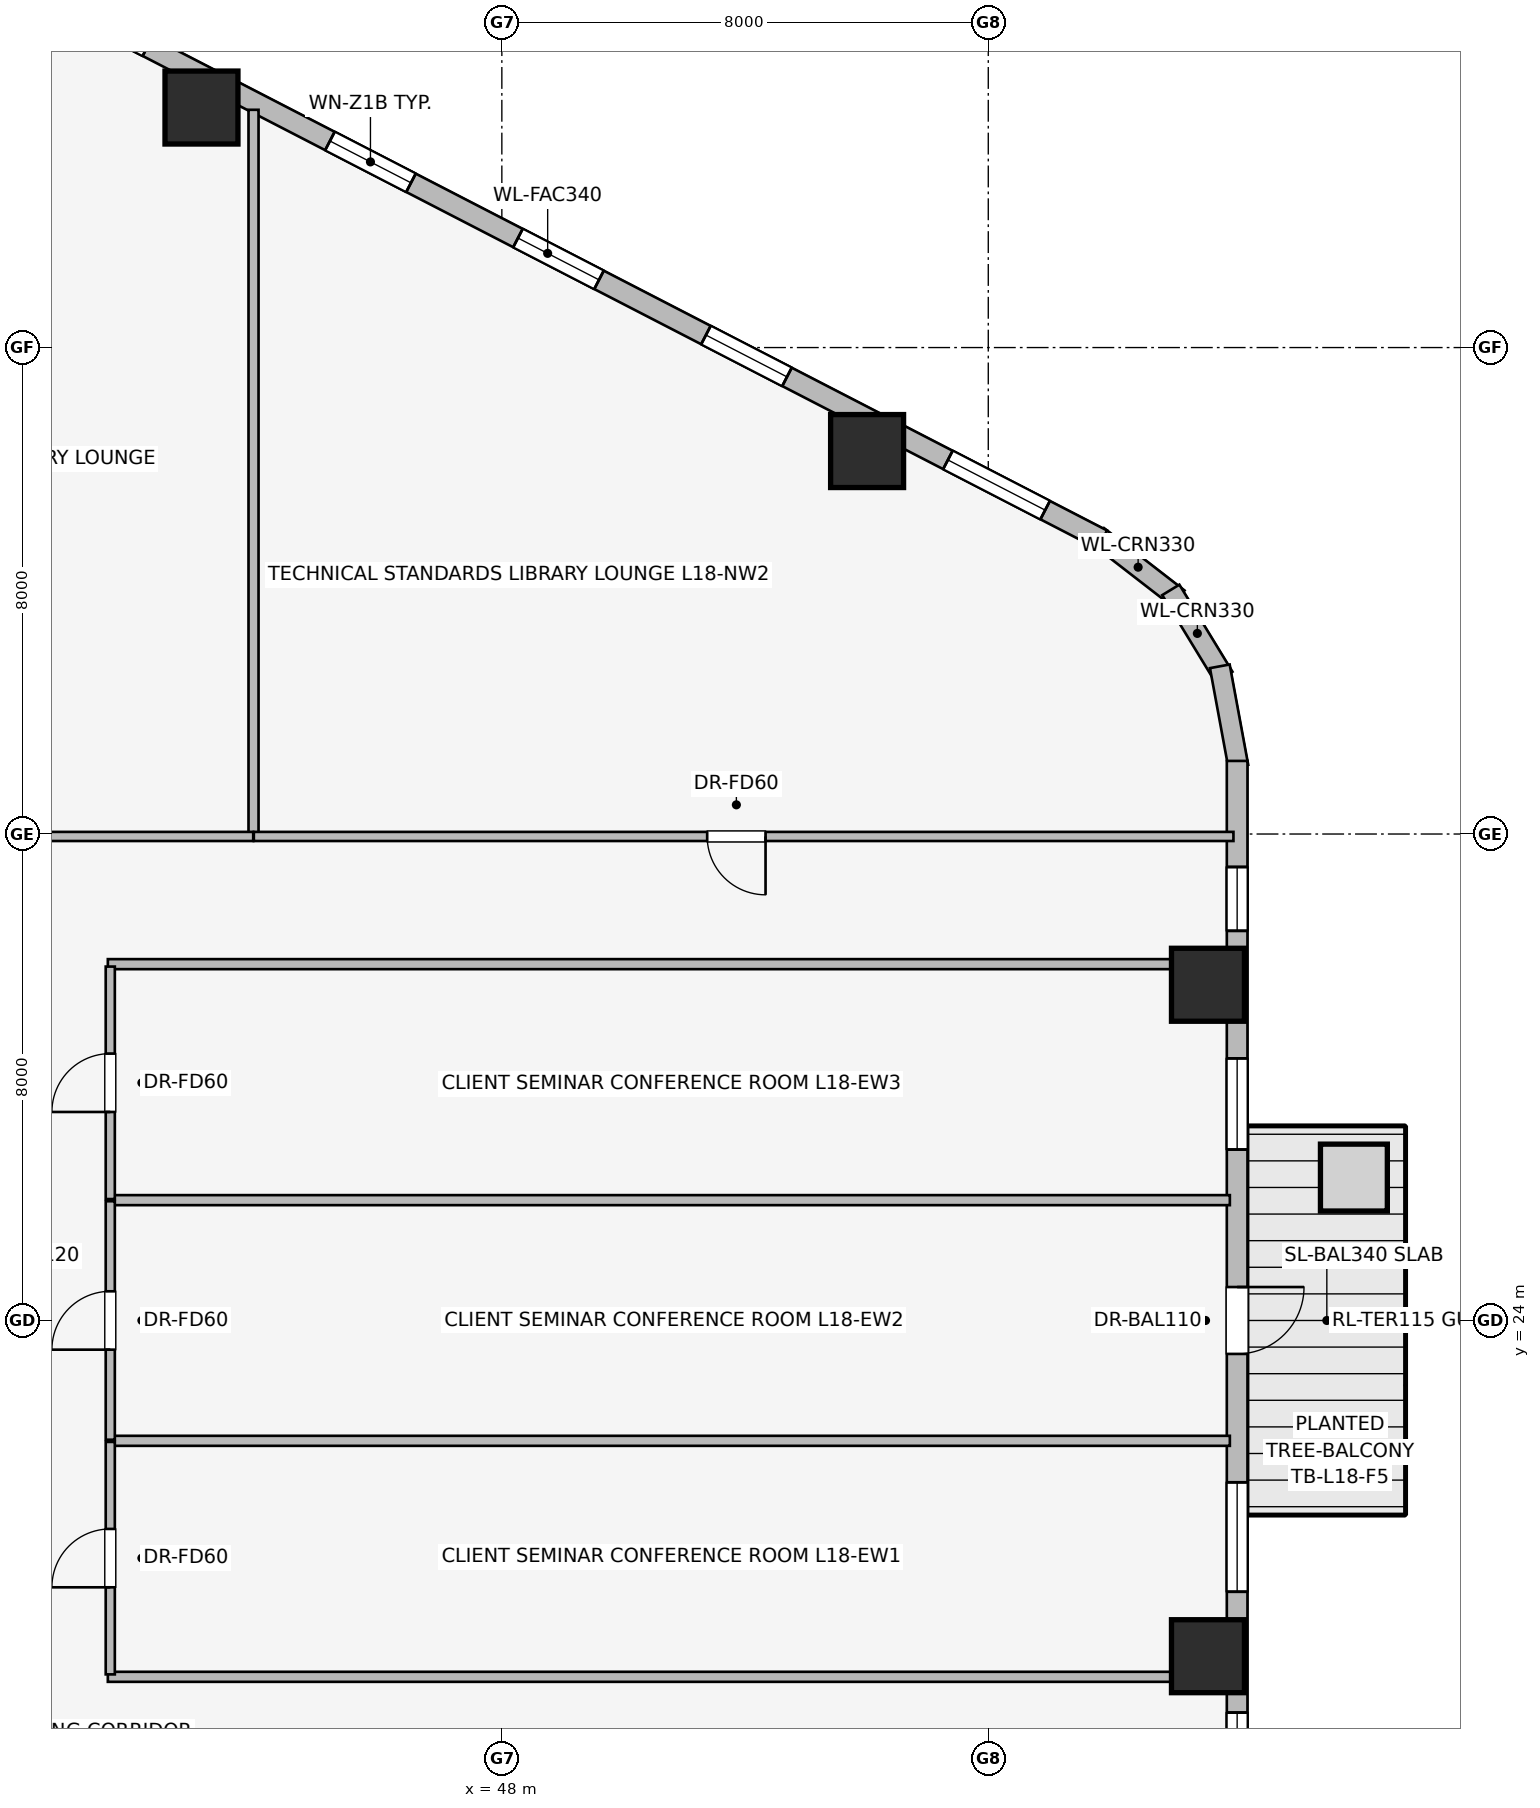
"""IFC4 building model, lengths in metres.
Left out: names, types, materials, properties, quantities, classifications, styles, units other than length and angle.
Written with IfcOpenShell. Run it as: python <this file> out.ifc"""

import sys

from ifc_helpers import new_model, si_unit, direction, frame, frame_2d, origin, origin_2d, place, context, subcontext, project, spatial, rectangle, extrude, element, fill, save


model = new_model("IFC4")
c1 = context("Model", 3, precision=1e-05, world=origin(), true_north=direction((0.0, 1.0)))
c2 = subcontext(c1, "Body", "Model", "MODEL_VIEW")
j1 = project(units=[si_unit("LENGTHUNIT", "METRE"), si_unit("PLANEANGLEUNIT", "RADIAN")], contexts=[c1])
p1 = place(None, origin())
s1 = spatial("IfcSite", under=j1, at=p1, CompositionType="ELEMENT")
p2 = place(p1, origin())
s2 = spatial("IfcBuilding", under=s1, at=p2, CompositionType="ELEMENT")
p3 = place(p2, frame((0.0, 0.0, 70.8)))
s3 = spatial("IfcBuildingStorey", under=s2, at=p3, CompositionType="ELEMENT", Elevation=70.8)
for number, where, z_axis, x_axis in (
    (1, (54.007, 38.298, 0.0), (0.0, 0.0, 1.0), (1.0, 0.0, 0.0)),
    (2, (43.06, 43.947, 0.0), (0.0, 0.0, 1.0), (1.0, 0.0, 0.0)),
    (3, (59.613, 18.479, 0.0), (0.0, 0.0, 1.0), (1.0, 0.0, 0.0)),
    (4, (59.613, 29.521, 0.0), (0.0, 0.0, 1.0), (1.0, 0.0, 0.0)),
):
    element("IfcColumn", number, at=place(p3, frame(where, z_axis=z_axis, x_axis=x_axis)), inside=s3, PredefinedType="COLUMN", context=c2, shape_type="SweptSolid", body=[
        extrude(rectangle(XDim=1.2, YDim=1.2, at=origin_2d()), origin(), (0.0, 0.0, 1.0), 3.65),
    ])
p4 = place(p3, frame((57.802, 36.901, 0.0), z_axis=(0.0, 0.0, 1.0), x_axis=(0.790691856293, -0.61221433207, 0.0)))
e5 = element("IfcWall", 5, at=p4, inside=s3, PredefinedType="STANDARD", context=c2, shape_type="SweptSolid", body=[
    extrude(rectangle(XDim=1.676, YDim=0.33, at=frame_2d((0.838, 0.0))), origin(), (0.0, 0.0, 1.0), 3.39),
])
p5 = place(p3, frame((59.002, 36.015, 0.0), z_axis=(0.0, 0.0, 1.0), x_axis=(0.520584129191, -0.853810379671, 0.0)))
e6 = element("IfcWall", 6, at=p5, inside=s3, PredefinedType="STANDARD", context=c2, shape_type="SweptSolid", body=[
    extrude(rectangle(XDim=1.677, YDim=0.33, at=frame_2d((0.838, 0.0))), origin(), (0.0, 0.0, 1.0), 3.39),
])
p6 = place(p3, frame((59.808, 34.758, 0.0), z_axis=(0.0, 0.0, 1.0), x_axis=(0.181714143354, -0.983351397063, 0.0)))
e7 = element("IfcWall", 7, at=p6, inside=s3, PredefinedType="STANDARD", context=c2, shape_type="SweptSolid", body=[
    extrude(rectangle(XDim=1.678, YDim=0.33, at=frame_2d((0.839, 0.0))), origin(), (0.0, 0.0, 1.0), 3.39),
])
p7 = place(p3, frame((39.631, 46.257, 0.0), z_axis=(0.0, 0.0, 1.0), x_axis=(0.888634413993, -0.458616264721, 0.0)))
e8 = element("IfcWall", 8, at=p7, inside=s3, PredefinedType="STANDARD", context=c2, shape_type="SweptSolid", body=[
    extrude(rectangle(XDim=20.531, YDim=0.34, at=frame_2d((10.266, 0.0))), origin(), (0.0, 0.0, 1.0), 2.684),
])
p8 = place(p7, frame((1.058, 0.0, 0.75)))
e9 = element("IfcOpeningElement", 9, at=p8, cuts=e8, PredefinedType="OPENING", context=c2, shape_type="SweptSolid", body=[
    extrude(rectangle(XDim=1.8, YDim=1.5, at=frame_2d((0.9, 0.75))), frame((0.0, 0.18, 0.0), z_axis=(0.0, -1.0, 0.0), x_axis=(1.0, 0.0, 0.0)), (0.0, 0.0, 1.0), 0.36),
])
p9 = place(p7, frame((6.236, 0.0, 0.75)))
e10 = element("IfcOpeningElement", 10, at=p9, cuts=e8, PredefinedType="OPENING", context=c2, shape_type="SweptSolid", body=[
    extrude(rectangle(XDim=1.5, YDim=1.5, at=frame_2d((0.75, 0.75))), frame((0.0, 0.18, 0.0), z_axis=(0.0, -1.0, 0.0), x_axis=(1.0, 0.0, 0.0)), (0.0, 0.0, 1.0), 0.36),
])
p10 = place(p7, frame((9.716, 0.0, 0.75)))
e11 = element("IfcOpeningElement", 11, at=p10, cuts=e8, PredefinedType="OPENING", context=c2, shape_type="SweptSolid", body=[
    extrude(rectangle(XDim=1.5, YDim=1.5, at=frame_2d((0.75, 0.75))), frame((0.0, 0.18, 0.0), z_axis=(0.0, -1.0, 0.0), x_axis=(1.0, 0.0, 0.0)), (0.0, 0.0, 1.0), 0.36),
])
p11 = place(p7, frame((13.195, 0.0, 0.75)))
e12 = element("IfcOpeningElement", 12, at=p11, cuts=e8, PredefinedType="OPENING", context=c2, shape_type="SweptSolid", body=[
    extrude(rectangle(XDim=1.5, YDim=1.5, at=frame_2d((0.75, 0.75))), frame((0.0, 0.18, 0.0), z_axis=(0.0, -1.0, 0.0), x_axis=(1.0, 0.0, 0.0)), (0.0, 0.0, 1.0), 0.36),
])
p12 = place(p7, frame((17.673, 0.0, 0.75)))
e13 = element("IfcOpeningElement", 13, at=p12, cuts=e8, PredefinedType="OPENING", context=c2, shape_type="SweptSolid", body=[
    extrude(rectangle(XDim=1.8, YDim=1.5, at=frame_2d((0.9, 0.75))), frame((0.0, 0.18, 0.0), z_axis=(0.0, -1.0, 0.0), x_axis=(1.0, 0.0, 0.0)), (0.0, 0.0, 1.0), 0.36),
])
p13 = place(p3, frame((60.093, 33.202, 0.0), z_axis=(0.0, 0.0, 1.0), x_axis=(0.0, -1.0, 0.0)))
e14 = element("IfcWall", 14, at=p13, inside=s3, PredefinedType="STANDARD", context=c2, shape_type="SweptSolid", body=[
    extrude(rectangle(XDim=18.404, YDim=0.34, at=frame_2d((9.202, 0.0))), origin(), (0.0, 0.0, 1.0), 2.684),
])
p14 = place(p13, frame((8.652, 0.0, 0.0)))
e15 = element("IfcOpeningElement", 15, at=p14, cuts=e14, PredefinedType="OPENING", context=c2, shape_type="SweptSolid", body=[
    extrude(rectangle(XDim=1.1, YDim=2.04, at=frame_2d((0.55, 1.02))), frame((0.0, 0.18, 0.0), z_axis=(0.0, -1.0, 0.0), x_axis=(1.0, 0.0, 0.0)), (0.0, 0.0, 1.0), 0.36),
])
p15 = place(p13, frame((1.744, 0.0, 0.75)))
e16 = element("IfcOpeningElement", 16, at=p15, cuts=e14, PredefinedType="OPENING", context=c2, shape_type="SweptSolid", body=[
    extrude(rectangle(XDim=1.05, YDim=1.4, at=frame_2d((0.525, 0.7))), frame((0.0, 0.18, 0.0), z_axis=(0.0, -1.0, 0.0), x_axis=(1.0, 0.0, 0.0)), (0.0, 0.0, 1.0), 0.36),
])
p16 = place(p13, frame((4.891, 0.0, 0.75)))
e17 = element("IfcOpeningElement", 17, at=p16, cuts=e14, PredefinedType="OPENING", context=c2, shape_type="SweptSolid", body=[
    extrude(rectangle(XDim=1.5, YDim=1.5, at=frame_2d((0.75, 0.75))), frame((0.0, 0.18, 0.0), z_axis=(0.0, -1.0, 0.0), x_axis=(1.0, 0.0, 0.0)), (0.0, 0.0, 1.0), 0.36),
])
p17 = place(p13, frame((11.863, 0.0, 0.75)))
e18 = element("IfcOpeningElement", 18, at=p17, cuts=e14, PredefinedType="OPENING", context=c2, shape_type="SweptSolid", body=[
    extrude(rectangle(XDim=1.8, YDim=1.5, at=frame_2d((0.9, 0.75))), frame((0.0, 0.18, 0.0), z_axis=(0.0, -1.0, 0.0), x_axis=(1.0, 0.0, 0.0)), (0.0, 0.0, 1.0), 0.36),
])
p18 = place(p13, frame((15.65, 0.0, 0.75)))
e19 = element("IfcOpeningElement", 19, at=p18, cuts=e14, PredefinedType="OPENING", context=c2, shape_type="SweptSolid", body=[
    extrude(rectangle(XDim=1.05, YDim=1.4, at=frame_2d((0.525, 0.7))), frame((0.0, 0.18, 0.0), z_axis=(0.0, -1.0, 0.0), x_axis=(1.0, 0.0, 0.0)), (0.0, 0.0, 1.0), 0.36),
])
p19 = place(p3, frame((43.916, 31.97, 0.0), z_axis=(0.0, 0.0, 1.0), x_axis=(0.0, 1.0, 0.0)))
e20 = element("IfcWall", 20, at=p19, inside=s3, PredefinedType="PARTITIONING", context=c2, shape_type="SweptSolid", body=[
    extrude(rectangle(XDim=11.94, YDim=0.165, at=frame_2d((5.97, 0.0))), origin(), (0.0, 0.0, 1.0), 3.39),
])
p20 = place(p3, frame((43.911, 31.96, 0.0), z_axis=(0.0, 0.0, 1.0), x_axis=(-1.0, 0.0, 0.0)))
e21 = element("IfcWall", 21, at=p20, inside=s3, PredefinedType="PARTITIONING", context=c2, shape_type="SweptSolid", body=[
    extrude(rectangle(XDim=9.621, YDim=0.15, at=frame_2d((4.811, 0.0))), origin(), (0.0, 0.0, 1.0), 3.39),
])
p21 = place(p20, frame((4.211, 0.0, 0.0)))
e22 = element("IfcOpeningElement", 22, at=p21, cuts=e21, PredefinedType="OPENING", context=c2, shape_type="SweptSolid", body=[
    extrude(rectangle(XDim=0.96, YDim=2.0, at=frame_2d((0.48, 1.0))), frame((0.0, 0.085, 0.0), z_axis=(0.0, -1.0, 0.0), x_axis=(1.0, 0.0, 0.0)), (0.0, 0.0, 1.0), 0.17),
])
p22 = place(p3, frame((60.032, 31.96, 0.0), z_axis=(0.0, 0.0, 1.0), x_axis=(-1.0, 0.0, 0.0)))
e23 = element("IfcWall", 23, at=p22, inside=s3, PredefinedType="PARTITIONING", context=c2, shape_type="SweptSolid", body=[
    extrude(rectangle(XDim=16.111, YDim=0.15, at=frame_2d((8.056, 0.0))), origin(), (0.0, 0.0, 1.0), 3.39),
])
p23 = place(p22, frame((7.695, 0.0, 0.0)))
e24 = element("IfcOpeningElement", 24, at=p23, cuts=e23, PredefinedType="OPENING", context=c2, shape_type="SweptSolid", body=[
    extrude(rectangle(XDim=0.96, YDim=2.0, at=frame_2d((0.48, 1.0))), frame((0.0, 0.085, 0.0), z_axis=(0.0, -1.0, 0.0), x_axis=(1.0, 0.0, 0.0)), (0.0, 0.0, 1.0), 0.17),
])
for number, where, z_axis, x_axis in (
    (25, (41.52, 18.14, 0.0), (0.0, 0.0, 1.0), (1.0, 0.0, 0.0)),
    (26, (41.52, 29.86, 0.0), (0.0, 0.0, 1.0), (1.0, 0.0, 0.0)),
):
    element("IfcWall", number, at=place(p3, frame(where, z_axis=z_axis, x_axis=x_axis)), inside=s3, PredefinedType="PARTITIONING", context=c2, shape_type="SweptSolid", body=[
        extrude(rectangle(XDim=18.453, YDim=0.165, at=frame_2d((9.227, 0.0))), origin(), (0.0, 0.0, 1.0), 3.39),
    ])
for number, where, z_axis, x_axis in (
    (27, (41.59, 22.021, 0.0), (0.0, 0.0, 1.0), (1.0, 0.0, 0.0)),
    (28, (41.59, 25.979, 0.0), (0.0, 0.0, 1.0), (1.0, 0.0, 0.0)),
):
    element("IfcWall", number, at=place(p3, frame(where, z_axis=z_axis, x_axis=x_axis)), inside=s3, PredefinedType="PARTITIONING", context=c2, shape_type="SweptSolid", body=[
        extrude(rectangle(XDim=18.383, YDim=0.165, at=frame_2d((9.191, 0.0))), origin(), (0.0, 0.0, 1.0), 3.39),
    ])
p24 = place(p3, frame((41.56, 18.18, 0.0), z_axis=(0.0, 0.0, 1.0), x_axis=(0.0, 1.0, 0.0)))
e29 = element("IfcWall", 29, at=p24, inside=s3, PredefinedType="PARTITIONING", context=c2, shape_type="SweptSolid", body=[
    extrude(rectangle(XDim=3.823, YDim=0.15, at=frame_2d((1.912, 0.0))), origin(), (0.0, 0.0, 1.0), 3.39),
])
p25 = place(p24, frame((1.432, 0.0, 0.0)))
e30 = element("IfcOpeningElement", 30, at=p25, cuts=e29, PredefinedType="OPENING", context=c2, shape_type="SweptSolid", body=[
    extrude(rectangle(XDim=0.96, YDim=2.0, at=frame_2d((0.48, 1.0))), frame((0.0, 0.085, 0.0), z_axis=(0.0, -1.0, 0.0), x_axis=(1.0, 0.0, 0.0)), (0.0, 0.0, 1.0), 0.17),
])
p26 = place(p3, frame((41.56, 22.039, 0.0), z_axis=(0.0, 0.0, 1.0), x_axis=(0.0, 1.0, 0.0)))
e31 = element("IfcWall", 31, at=p26, inside=s3, PredefinedType="PARTITIONING", context=c2, shape_type="SweptSolid", body=[
    extrude(rectangle(XDim=3.922, YDim=0.15, at=frame_2d((1.961, 0.0))), origin(), (0.0, 0.0, 1.0), 3.39),
])
p27 = place(p26, frame((1.481, 0.0, 0.0)))
e32 = element("IfcOpeningElement", 32, at=p27, cuts=e31, PredefinedType="OPENING", context=c2, shape_type="SweptSolid", body=[
    extrude(rectangle(XDim=0.96, YDim=2.0, at=frame_2d((0.48, 1.0))), frame((0.0, 0.085, 0.0), z_axis=(0.0, -1.0, 0.0), x_axis=(1.0, 0.0, 0.0)), (0.0, 0.0, 1.0), 0.17),
])
p28 = place(p3, frame((41.56, 25.997, 0.0), z_axis=(0.0, 0.0, 1.0), x_axis=(0.0, 1.0, 0.0)))
e33 = element("IfcWall", 33, at=p28, inside=s3, PredefinedType="PARTITIONING", context=c2, shape_type="SweptSolid", body=[
    extrude(rectangle(XDim=3.823, YDim=0.15, at=frame_2d((1.912, 0.0))), origin(), (0.0, 0.0, 1.0), 3.39),
])
p29 = place(p28, frame((1.432, 0.0, 0.0)))
e34 = element("IfcOpeningElement", 34, at=p29, cuts=e33, PredefinedType="OPENING", context=c2, shape_type="SweptSolid", body=[
    extrude(rectangle(XDim=0.96, YDim=2.0, at=frame_2d((0.48, 1.0))), frame((0.0, 0.085, 0.0), z_axis=(0.0, -1.0, 0.0), x_axis=(1.0, 0.0, 0.0)), (0.0, 0.0, 1.0), 0.17),
])
p30 = place(p9, origin())
e35 = element("IfcWindow", 35, at=p30, inside=s3, PartitioningType="SINGLE_PANEL", PredefinedType="WINDOW", context=c2, shape_type="SweptSolid", body=[
    extrude(rectangle(XDim=1.5, YDim=1.5, at=frame_2d((0.75, 0.75))), frame((0.0, 0.03, 0.0), z_axis=(0.0, -1.0, 0.0), x_axis=(1.0, 0.0, 0.0)), (0.0, 0.0, 1.0), 0.06),
])
fill(e10, e35)
p31 = place(p10, origin())
e36 = element("IfcWindow", 36, at=p31, inside=s3, PartitioningType="SINGLE_PANEL", PredefinedType="WINDOW", context=c2, shape_type="SweptSolid", body=[
    extrude(rectangle(XDim=1.5, YDim=1.5, at=frame_2d((0.75, 0.75))), frame((0.0, 0.03, 0.0), z_axis=(0.0, -1.0, 0.0), x_axis=(1.0, 0.0, 0.0)), (0.0, 0.0, 1.0), 0.06),
])
fill(e11, e36)
p32 = place(p11, origin())
e37 = element("IfcWindow", 37, at=p32, inside=s3, PartitioningType="SINGLE_PANEL", PredefinedType="WINDOW", context=c2, shape_type="SweptSolid", body=[
    extrude(rectangle(XDim=1.5, YDim=1.5, at=frame_2d((0.75, 0.75))), frame((0.0, 0.03, 0.0), z_axis=(0.0, -1.0, 0.0), x_axis=(1.0, 0.0, 0.0)), (0.0, 0.0, 1.0), 0.06),
])
fill(e12, e37)
p33 = place(p12, origin())
e38 = element("IfcWindow", 38, at=p33, inside=s3, PartitioningType="SINGLE_PANEL", PredefinedType="WINDOW", context=c2, shape_type="SweptSolid", body=[
    extrude(rectangle(XDim=1.8, YDim=1.5, at=frame_2d((0.9, 0.75))), frame((0.0, 0.03, 0.0), z_axis=(0.0, -1.0, 0.0), x_axis=(1.0, 0.0, 0.0)), (0.0, 0.0, 1.0), 0.06),
])
fill(e13, e38)
p34 = place(p14, origin())
e39 = element("IfcDoor", 39, at=p34, inside=s3, OperationType="SINGLE_SWING_LEFT", PredefinedType="DOOR", context=c2, shape_type="SweptSolid", body=[
    extrude(rectangle(XDim=1.1, YDim=2.04, at=frame_2d((0.55, 1.02))), frame((0.0, 0.025, 0.0), z_axis=(0.0, -1.0, 0.0), x_axis=(1.0, 0.0, 0.0)), (0.0, 0.0, 1.0), 0.05),
])
fill(e15, e39)
p35 = place(p15, origin())
e40 = element("IfcWindow", 40, at=p35, inside=s3, PartitioningType="SINGLE_PANEL", PredefinedType="WINDOW", context=c2, shape_type="SweptSolid", body=[
    extrude(rectangle(XDim=1.05, YDim=1.4, at=frame_2d((0.525, 0.7))), frame((0.0, 0.03, 0.0), z_axis=(0.0, -1.0, 0.0), x_axis=(1.0, 0.0, 0.0)), (0.0, 0.0, 1.0), 0.06),
])
fill(e16, e40)
p36 = place(p16, origin())
e41 = element("IfcWindow", 41, at=p36, inside=s3, PartitioningType="SINGLE_PANEL", PredefinedType="WINDOW", context=c2, shape_type="SweptSolid", body=[
    extrude(rectangle(XDim=1.5, YDim=1.5, at=frame_2d((0.75, 0.75))), frame((0.0, 0.03, 0.0), z_axis=(0.0, -1.0, 0.0), x_axis=(1.0, 0.0, 0.0)), (0.0, 0.0, 1.0), 0.06),
])
fill(e17, e41)
p37 = place(p17, origin())
e42 = element("IfcWindow", 42, at=p37, inside=s3, PartitioningType="SINGLE_PANEL", PredefinedType="WINDOW", context=c2, shape_type="SweptSolid", body=[
    extrude(rectangle(XDim=1.8, YDim=1.5, at=frame_2d((0.9, 0.75))), frame((0.0, 0.03, 0.0), z_axis=(0.0, -1.0, 0.0), x_axis=(1.0, 0.0, 0.0)), (0.0, 0.0, 1.0), 0.06),
])
fill(e18, e42)
p38 = place(p18, origin())
e43 = element("IfcWindow", 43, at=p38, inside=s3, PartitioningType="SINGLE_PANEL", PredefinedType="WINDOW", context=c2, shape_type="SweptSolid", body=[
    extrude(rectangle(XDim=1.05, YDim=1.4, at=frame_2d((0.525, 0.7))), frame((0.0, 0.03, 0.0), z_axis=(0.0, -1.0, 0.0), x_axis=(1.0, 0.0, 0.0)), (0.0, 0.0, 1.0), 0.06),
])
fill(e19, e43)
p39 = place(p23, origin())
e44 = element("IfcDoor", 44, at=p39, inside=s3, OperationType="SINGLE_SWING_LEFT", PredefinedType="DOOR", context=c2, shape_type="SweptSolid", body=[
    extrude(rectangle(XDim=0.96, YDim=2.0, at=frame_2d((0.48, 1.0))), frame((0.0, 0.025, 0.0), z_axis=(0.0, -1.0, 0.0), x_axis=(1.0, 0.0, 0.0)), (0.0, 0.0, 1.0), 0.05),
])
fill(e24, e44)
p40 = place(p25, origin())
e45 = element("IfcDoor", 45, at=p40, inside=s3, OperationType="SINGLE_SWING_LEFT", PredefinedType="DOOR", context=c2, shape_type="SweptSolid", body=[
    extrude(rectangle(XDim=0.96, YDim=2.0, at=frame_2d((0.48, 1.0))), frame((0.0, 0.025, 0.0), z_axis=(0.0, -1.0, 0.0), x_axis=(1.0, 0.0, 0.0)), (0.0, 0.0, 1.0), 0.05),
])
fill(e30, e45)
p41 = place(p27, origin())
e46 = element("IfcDoor", 46, at=p41, inside=s3, OperationType="SINGLE_SWING_LEFT", PredefinedType="DOOR", context=c2, shape_type="SweptSolid", body=[
    extrude(rectangle(XDim=0.96, YDim=2.0, at=frame_2d((0.48, 1.0))), frame((0.0, 0.025, 0.0), z_axis=(0.0, -1.0, 0.0), x_axis=(1.0, 0.0, 0.0)), (0.0, 0.0, 1.0), 0.05),
])
fill(e32, e46)
p42 = place(p29, origin())
e47 = element("IfcDoor", 47, at=p42, inside=s3, OperationType="SINGLE_SWING_LEFT", PredefinedType="DOOR", context=c2, shape_type="SweptSolid", body=[
    extrude(rectangle(XDim=0.96, YDim=2.0, at=frame_2d((0.48, 1.0))), frame((0.0, 0.025, 0.0), z_axis=(0.0, -1.0, 0.0), x_axis=(1.0, 0.0, 0.0)), (0.0, 0.0, 1.0), 0.05),
])
fill(e34, e47)
save(model, sys.argv[1])
